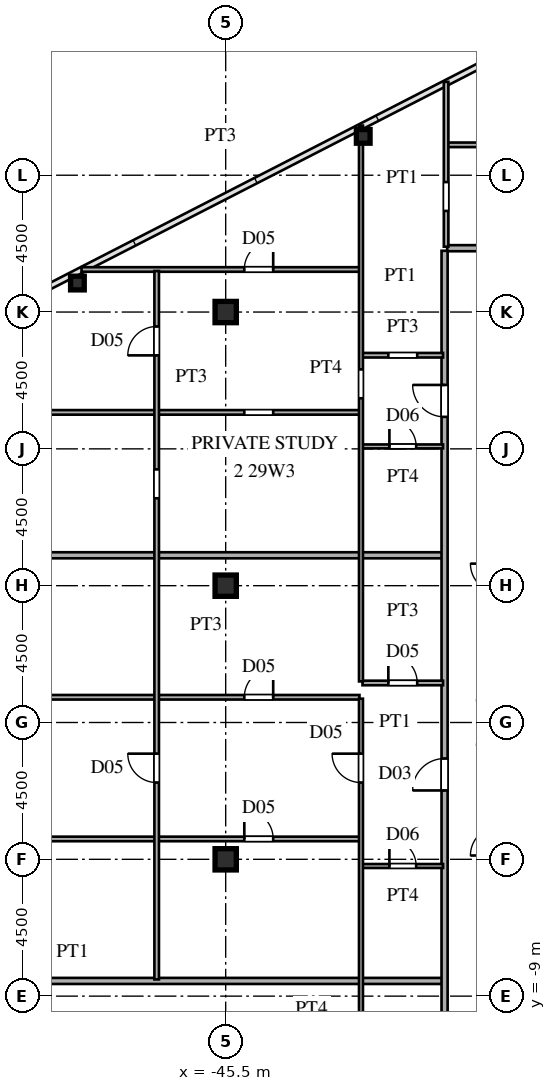
"""IFC4 building model, lengths in metres.
Left out: names, types, materials, properties, quantities, classifications, styles, units other than length and angle.
Written with IfcOpenShell. Run it as: python <this file> out.ifc"""

import sys

from ifc_helpers import new_model, si_unit, direction, frame, frame_2d, origin, origin_2d, place, context, subcontext, project, spatial, rectangle, hollow_rectangle, i_section, extrude, source, transform, mapped, element, fill, save


model = new_model("IFC4")
c1 = context("Model", 3, precision=1e-05, world=origin(), true_north=direction((0.0, 1.0)))
c2 = subcontext(c1, "Body", "Model", "MODEL_VIEW")
j1 = project(units=[si_unit("LENGTHUNIT", "METRE"), si_unit("PLANEANGLEUNIT", "RADIAN")], contexts=[c1])
p1 = place(None, origin())
s1 = spatial("IfcSite", under=j1, at=p1, CompositionType="ELEMENT")
p2 = place(p1, origin())
s2 = spatial("IfcBuilding", under=s1, at=p2, CompositionType="ELEMENT")
p3 = place(p2, frame((0.0, 0.0, 110.4)))
s3 = spatial("IfcBuildingStorey", under=s2, at=p3, CompositionType="ELEMENT", Elevation=110.4)
m1 = source(origin(), c2, "Body", "SweptSolid", [
    extrude(i_section(OverallWidth=0.7, OverallDepth=0.7, WebThickness=0.028, FlangeThickness=0.045, at=origin_2d()), origin(), (0.0, 0.0, 1.0), 3.6),
])
for number, where, z_axis, x_axis in (
    (1, (-45.5, -4.5, 0.0), (0.0, 0.0, 1.0), (1.0, 0.0, 0.0)),
    (2, (-45.5, 4.5, 0.0), (0.0, 0.0, 1.0), (1.0, 0.0, 0.0)),
    (3, (-45.5, 13.5, 0.0), (0.0, 0.0, 1.0), (1.0, 0.0, 0.0)),
):
    element("IfcColumn", number, at=place(p3, frame(where, z_axis=z_axis, x_axis=x_axis)), inside=s3, PredefinedType="COLUMN", context=c2, shape_type="MappedRepresentation", body=[
        mapped(m1, transform((0.0, 0.0, 0.0), scale=1.0)),
    ])
m2 = source(origin(), c2, "Body", "SweptSolid", [
    extrude(hollow_rectangle(XDim=0.45, YDim=0.45, WallThickness=0.018, at=origin_2d()), origin(), (0.0, 0.0, 1.0), 3.6),
])
for number, where, z_axis, x_axis in (
    (4, (-40.976, 19.278, 0.0), (0.0, 0.0, 1.0), (1.0, 0.0, 0.0)),
    (5, (-50.377, 14.453, 0.0), (0.0, 0.0, 1.0), (1.0, 0.0, 0.0)),
):
    element("IfcColumn", number, at=place(p3, frame(where, z_axis=z_axis, x_axis=x_axis)), inside=s3, PredefinedType="COLUMN", context=c2, shape_type="MappedRepresentation", body=[
        mapped(m2, transform((0.0, 0.0, 0.0), scale=1.0)),
    ])
p4 = place(p3, frame((-62.69, -8.5, 0.0), z_axis=(0.0, 0.0, 1.0), x_axis=(1.0, 0.0, 0.0)))
e6 = element("IfcWall", 6, at=p4, inside=s3, PredefinedType="PARTITIONING", context=c2, shape_type="SweptSolid", body=[
    extrude(rectangle(XDim=24.31, YDim=0.2, at=frame_2d((12.155, 0.0))), origin(), (0.0, 0.0, 1.0), 3.38),
])
p5 = place(p3, frame((-41.0, -4.72, 0.0), z_axis=(0.0, 0.0, 1.0), x_axis=(1.0, 0.0, 0.0)))
e7 = element("IfcWall", 7, at=p5, inside=s3, PredefinedType="PARTITIONING", context=c2, shape_type="SweptSolid", body=[
    extrude(rectangle(XDim=2.65, YDim=0.13, at=frame_2d((1.325, 0.0))), origin(), (0.0, 0.0, 1.0), 3.38),
])
p6 = place(p5, frame((0.885, 0.0, 0.0)))
e8 = element("IfcOpeningElement", 8, at=p6, cuts=e7, PredefinedType="OPENING", context=c2, shape_type="SweptSolid", body=[
    extrude(rectangle(XDim=0.88, YDim=2.1, at=frame_2d((0.44, 1.05))), frame((0.0, 0.075, 0.0), z_axis=(0.0, -1.0, 0.0), x_axis=(1.0, 0.0, 0.0)), (0.0, 0.0, 1.0), 0.15),
])
p7 = place(p3, frame((-69.535, -3.83, 0.0), z_axis=(0.0, 0.0, 1.0), x_axis=(1.0, 0.0, 0.0)))
e9 = element("IfcWall", 9, at=p7, inside=s3, PredefinedType="PARTITIONING", context=c2, shape_type="SweptSolid", body=[
    extrude(rectangle(XDim=28.435, YDim=0.15, at=frame_2d((14.217, 0.0))), origin(), (0.0, 0.0, 1.0), 3.38),
])
p8 = place(p7, frame((24.647, 0.0, 0.0)))
e10 = element("IfcOpeningElement", 10, at=p8, cuts=e9, PredefinedType="OPENING", context=c2, shape_type="SweptSolid", body=[
    extrude(rectangle(XDim=0.95, YDim=2.15, at=frame_2d((0.475, 1.075))), frame((0.0, 0.085, 0.0), z_axis=(0.0, -1.0, 0.0), x_axis=(1.0, 0.0, 0.0)), (0.0, 0.0, 1.0), 0.17),
])
p9 = place(p7, frame((11.71, 0.0, 0.0)))
e11 = element("IfcOpeningElement", 11, at=p9, cuts=e9, PredefinedType="OPENING", context=c2, shape_type="SweptSolid", body=[
    extrude(rectangle(XDim=0.95, YDim=2.15, at=frame_2d((0.475, 1.075))), frame((0.0, 0.085, 0.0), z_axis=(0.0, -1.0, 0.0), x_axis=(1.0, 0.0, 0.0)), (0.0, 0.0, 1.0), 0.17),
])
p10 = place(p3, frame((-69.535, 0.83, 0.0), z_axis=(0.0, 0.0, 1.0), x_axis=(1.0, 0.0, 0.0)))
e12 = element("IfcWall", 12, at=p10, inside=s3, PredefinedType="PARTITIONING", context=c2, shape_type="SweptSolid", body=[
    extrude(rectangle(XDim=28.435, YDim=0.15, at=frame_2d((14.217, 0.0))), origin(), (0.0, 0.0, 1.0), 3.38),
])
p11 = place(p10, frame((24.647, 0.0, 0.0)))
e13 = element("IfcOpeningElement", 13, at=p11, cuts=e12, PredefinedType="OPENING", context=c2, shape_type="SweptSolid", body=[
    extrude(rectangle(XDim=0.95, YDim=2.15, at=frame_2d((0.475, 1.075))), frame((0.0, 0.085, 0.0), z_axis=(0.0, -1.0, 0.0), x_axis=(1.0, 0.0, 0.0)), (0.0, 0.0, 1.0), 0.17),
])
p12 = place(p10, frame((11.71, 0.0, 0.0)))
e14 = element("IfcOpeningElement", 14, at=p12, cuts=e12, PredefinedType="OPENING", context=c2, shape_type="SweptSolid", body=[
    extrude(rectangle(XDim=0.95, YDim=2.15, at=frame_2d((0.475, 1.075))), frame((0.0, 0.085, 0.0), z_axis=(0.0, -1.0, 0.0), x_axis=(1.0, 0.0, 0.0)), (0.0, 0.0, 1.0), 0.17),
])
p13 = place(p3, frame((-41.0, 1.3, 0.0), z_axis=(0.0, 0.0, 1.0), x_axis=(1.0, 0.0, 0.0)))
e15 = element("IfcWall", 15, at=p13, inside=s3, PredefinedType="PARTITIONING", context=c2, shape_type="SweptSolid", body=[
    extrude(rectangle(XDim=2.65, YDim=0.15, at=frame_2d((1.325, 0.0))), origin(), (0.0, 0.0, 1.0), 3.38),
])
p14 = place(p13, frame((0.85, 0.0, 0.0)))
e16 = element("IfcOpeningElement", 16, at=p14, cuts=e15, PredefinedType="OPENING", context=c2, shape_type="SweptSolid", body=[
    extrude(rectangle(XDim=0.95, YDim=2.15, at=frame_2d((0.475, 1.075))), frame((0.0, 0.085, 0.0), z_axis=(0.0, -1.0, 0.0), x_axis=(1.0, 0.0, 0.0)), (0.0, 0.0, 1.0), 0.17),
])
p15 = place(p3, frame((-68.458, 5.5, 0.0), z_axis=(0.0, 0.0, 1.0), x_axis=(1.0, 0.0, 0.0)))
e17 = element("IfcWall", 17, at=p15, inside=s3, PredefinedType="PARTITIONING", context=c2, shape_type="SweptSolid", body=[
    extrude(rectangle(XDim=30.079, YDim=0.2, at=frame_2d((15.039, 0.0))), origin(), (0.0, 0.0, 1.0), 3.38),
])
p16 = place(p3, frame((-41.0, 9.08, 0.0), z_axis=(0.0, 0.0, 1.0), x_axis=(1.0, 0.0, 0.0)))
e18 = element("IfcWall", 18, at=p16, inside=s3, PredefinedType="PARTITIONING", context=c2, shape_type="SweptSolid", body=[
    extrude(rectangle(XDim=2.65, YDim=0.13, at=frame_2d((1.325, 0.0))), origin(), (0.0, 0.0, 1.0), 3.38),
])
p17 = place(p16, frame((0.885, 0.0, 0.0)))
e19 = element("IfcOpeningElement", 19, at=p17, cuts=e18, PredefinedType="OPENING", context=c2, shape_type="SweptSolid", body=[
    extrude(rectangle(XDim=0.88, YDim=2.1, at=frame_2d((0.44, 1.05))), frame((0.0, 0.075, 0.0), z_axis=(0.0, -1.0, 0.0), x_axis=(1.0, 0.0, 0.0)), (0.0, 0.0, 1.0), 0.15),
])
p18 = place(p3, frame((-54.45, 10.2, 0.0), z_axis=(0.0, 0.0, 1.0), x_axis=(1.0, 0.0, 0.0)))
e20 = element("IfcWall", 20, at=p18, inside=s3, PredefinedType="PARTITIONING", context=c2, shape_type="SweptSolid", body=[
    extrude(rectangle(XDim=13.35, YDim=0.15, at=frame_2d((6.675, 0.0))), origin(), (0.0, 0.0, 1.0), 3.38),
])
p19 = place(p18, frame((9.562, 0.0, 0.0)))
e21 = element("IfcOpeningElement", 21, at=p19, cuts=e20, PredefinedType="OPENING", context=c2, shape_type="SweptSolid", body=[
    extrude(rectangle(XDim=0.95, YDim=2.15, at=frame_2d((0.475, 1.075))), frame((0.0, 0.085, 0.0), z_axis=(0.0, -1.0, 0.0), x_axis=(1.0, 0.0, 0.0)), (0.0, 0.0, 1.0), 0.17),
])
p20 = place(p3, frame((-41.0, 12.08, 0.0), z_axis=(0.0, 0.0, 1.0), x_axis=(1.0, 0.0, 0.0)))
e22 = element("IfcWall", 22, at=p20, inside=s3, PredefinedType="PARTITIONING", context=c2, shape_type="SweptSolid", body=[
    extrude(rectangle(XDim=2.65, YDim=0.15, at=frame_2d((1.325, 0.0))), origin(), (0.0, 0.0, 1.0), 3.38),
])
p21 = place(p20, frame((0.85, 0.0, 0.0)))
e23 = element("IfcOpeningElement", 23, at=p21, cuts=e22, PredefinedType="OPENING", context=c2, shape_type="SweptSolid", body=[
    extrude(rectangle(XDim=0.95, YDim=2.15, at=frame_2d((0.475, 1.075))), frame((0.0, 0.085, 0.0), z_axis=(0.0, -1.0, 0.0), x_axis=(1.0, 0.0, 0.0)), (0.0, 0.0, 1.0), 0.17),
])
p22 = place(p3, frame((-50.243, 14.9, 0.0), z_axis=(0.0, 0.0, 1.0), x_axis=(1.0, 0.0, 0.0)))
e24 = element("IfcWall", 24, at=p22, inside=s3, PredefinedType="PARTITIONING", context=c2, shape_type="SweptSolid", body=[
    extrude(rectangle(XDim=9.143, YDim=0.15, at=frame_2d((4.571, 0.0))), origin(), (0.0, 0.0, 1.0), 3.38),
])
p23 = place(p22, frame((5.355, 0.0, 0.0)))
e25 = element("IfcOpeningElement", 25, at=p23, cuts=e24, PredefinedType="OPENING", context=c2, shape_type="SweptSolid", body=[
    extrude(rectangle(XDim=0.95, YDim=2.15, at=frame_2d((0.475, 1.075))), frame((0.0, 0.085, 0.0), z_axis=(0.0, -1.0, 0.0), x_axis=(1.0, 0.0, 0.0)), (0.0, 0.0, 1.0), 0.17),
])
p24 = place(p3, frame((-38.215, 15.6, 0.0), z_axis=(0.0, 0.0, 1.0), x_axis=(1.0, 0.0, 0.0)))
e26 = element("IfcWall", 26, at=p24, inside=s3, PredefinedType="PARTITIONING", context=c2, shape_type="SweptSolid", body=[
    extrude(rectangle(XDim=1.63, YDim=0.2, at=frame_2d((0.815, 0.0))), origin(), (0.0, 0.0, 1.0), 3.38),
])
p25 = place(p3, frame((-38.2, 19.0, 0.0), z_axis=(0.0, 0.0, 1.0), x_axis=(1.0, 0.0, 0.0)))
e27 = element("IfcWall", 27, at=p25, inside=s3, PredefinedType="PARTITIONING", context=c2, shape_type="SweptSolid", body=[
    extrude(rectangle(XDim=10.735, YDim=0.15, at=frame_2d((5.367, 0.0))), origin(), (0.0, 0.0, 1.0), 3.38),
])
p26 = place(p25, frame((4.85, 0.0, 0.0)))
e28 = element("IfcOpeningElement", 28, at=p26, cuts=e27, PredefinedType="OPENING", context=c2, shape_type="SweptSolid", body=[
    extrude(rectangle(XDim=0.95, YDim=2.15, at=frame_2d((0.475, 1.075))), frame((0.0, 0.085, 0.0), z_axis=(0.0, -1.0, 0.0), x_axis=(1.0, 0.0, 0.0)), (0.0, 0.0, 1.0), 0.17),
])
p27 = place(p3, frame((-47.77, -8.45, 0.0), z_axis=(0.0, 0.0, 1.0), x_axis=(0.0, 1.0, 0.0)))
e29 = element("IfcWall", 29, at=p27, inside=s3, PredefinedType="PARTITIONING", context=c2, shape_type="SweptSolid", body=[
    extrude(rectangle(XDim=23.3, YDim=0.15, at=frame_2d((11.65, 0.0))), origin(), (0.0, 0.0, 1.0), 3.38),
])
p28 = place(p27, frame((6.475, 0.0, 0.0)))
e30 = element("IfcOpeningElement", 30, at=p28, cuts=e29, PredefinedType="OPENING", context=c2, shape_type="SweptSolid", body=[
    extrude(rectangle(XDim=0.95, YDim=2.15, at=frame_2d((0.475, 1.075))), frame((0.0, 0.085, 0.0), z_axis=(0.0, -1.0, 0.0), x_axis=(1.0, 0.0, 0.0)), (0.0, 0.0, 1.0), 0.17),
])
p29 = place(p27, frame((20.525, 0.0, 0.0)))
e31 = element("IfcOpeningElement", 31, at=p29, cuts=e29, PredefinedType="OPENING", context=c2, shape_type="SweptSolid", body=[
    extrude(rectangle(XDim=0.95, YDim=2.15, at=frame_2d((0.475, 1.075))), frame((0.0, 0.085, 0.0), z_axis=(0.0, -1.0, 0.0), x_axis=(1.0, 0.0, 0.0)), (0.0, 0.0, 1.0), 0.17),
])
p30 = place(p27, frame((15.825, 0.0, 0.0)))
e32 = element("IfcOpeningElement", 32, at=p30, cuts=e29, PredefinedType="OPENING", context=c2, shape_type="SweptSolid", body=[
    extrude(rectangle(XDim=0.95, YDim=2.15, at=frame_2d((0.475, 1.075))), frame((0.0, 0.085, 0.0), z_axis=(0.0, -1.0, 0.0), x_axis=(1.0, 0.0, 0.0)), (0.0, 0.0, 1.0), 0.17),
])
p31 = place(p3, frame((-41.05, -19.634, 0.0), z_axis=(0.0, 0.0, 1.0), x_axis=(0.0, 1.0, 0.0)))
e33 = element("IfcWall", 33, at=p31, inside=s3, PredefinedType="PARTITIONING", context=c2, shape_type="SweptSolid", body=[
    extrude(rectangle(XDim=20.417, YDim=0.13, at=frame_2d((10.208, 0.0))), origin(), (0.0, 0.0, 1.0), 2.99),
])
p32 = place(p31, frame((5.987, 0.0, 0.0)))
e34 = element("IfcOpeningElement", 34, at=p32, cuts=e33, PredefinedType="OPENING", context=c2, shape_type="SweptSolid", body=[
    extrude(rectangle(XDim=0.95, YDim=2.15, at=frame_2d((0.475, 1.075))), frame((0.0, 0.075, 0.0), z_axis=(0.0, -1.0, 0.0), x_axis=(1.0, 0.0, 0.0)), (0.0, 0.0, 1.0), 0.15),
])
p33 = place(p31, frame((17.659, 0.0, 0.0)))
e35 = element("IfcOpeningElement", 35, at=p33, cuts=e33, PredefinedType="OPENING", context=c2, shape_type="SweptSolid", body=[
    extrude(rectangle(XDim=0.95, YDim=2.15, at=frame_2d((0.475, 1.075))), frame((0.0, 0.075, 0.0), z_axis=(0.0, -1.0, 0.0), x_axis=(1.0, 0.0, 0.0)), (0.0, 0.0, 1.0), 0.15),
])
p34 = place(p3, frame((-41.05, 1.352, 0.0), z_axis=(0.0, 0.0, 1.0), x_axis=(0.0, 1.0, 0.0)))
e36 = element("IfcWall", 36, at=p34, inside=s3, PredefinedType="PARTITIONING", context=c2, shape_type="SweptSolid", body=[
    extrude(rectangle(XDim=18.282, YDim=0.13, at=frame_2d((9.141, 0.0))), origin(), (0.0, 0.0, 1.0), 2.99),
])
p35 = place(p34, frame((9.312, 0.0, 0.0)))
e37 = element("IfcOpeningElement", 37, at=p35, cuts=e36, PredefinedType="OPENING", context=c2, shape_type="SweptSolid", body=[
    extrude(rectangle(XDim=0.95, YDim=2.15, at=frame_2d((0.475, 1.075))), frame((0.0, 0.075, 0.0), z_axis=(0.0, -1.0, 0.0), x_axis=(1.0, 0.0, 0.0)), (0.0, 0.0, 1.0), 0.15),
])
p36 = place(p3, frame((-38.3, -15.515, 0.0), z_axis=(0.0, 0.0, 1.0), x_axis=(0.0, 1.0, 0.0)))
e38 = element("IfcWall", 38, at=p36, inside=s3, PredefinedType="PARTITIONING", context=c2, shape_type="SweptSolid", body=[
    extrude(rectangle(XDim=31.03, YDim=0.2, at=frame_2d((15.515, 0.0))), origin(), (0.0, 0.0, 1.0), 3.38),
])
p37 = place(p36, frame((2.345, 0.0, 0.0)))
e39 = element("IfcOpeningElement", 39, at=p37, cuts=e38, PredefinedType="OPENING", context=c2, shape_type="SweptSolid", body=[
    extrude(rectangle(XDim=1.05, YDim=2.25, at=frame_2d((0.525, 1.125))), frame((0.0, 0.11, 0.0), z_axis=(0.0, -1.0, 0.0), x_axis=(1.0, 0.0, 0.0)), (0.0, 0.0, 1.0), 0.22),
])
p38 = place(p36, frame((13.28, 0.0, 0.0)))
e40 = element("IfcOpeningElement", 40, at=p38, cuts=e38, PredefinedType="OPENING", context=c2, shape_type="SweptSolid", body=[
    extrude(rectangle(XDim=1.05, YDim=2.25, at=frame_2d((0.525, 1.125))), frame((0.0, 0.11, 0.0), z_axis=(0.0, -1.0, 0.0), x_axis=(1.0, 0.0, 0.0)), (0.0, 0.0, 1.0), 0.22),
])
p39 = place(p36, frame((25.567, 0.0, 0.0)))
e41 = element("IfcOpeningElement", 41, at=p39, cuts=e38, PredefinedType="OPENING", context=c2, shape_type="SweptSolid", body=[
    extrude(rectangle(XDim=1.05, YDim=2.25, at=frame_2d((0.525, 1.125))), frame((0.0, 0.11, 0.0), z_axis=(0.0, -1.0, 0.0), x_axis=(1.0, 0.0, 0.0)), (0.0, 0.0, 1.0), 0.22),
])
p40 = place(p3, frame((-38.25, 15.65, 0.0), z_axis=(0.0, 0.0, 1.0), x_axis=(0.0, 1.0, 0.0)))
e42 = element("IfcWall", 42, at=p40, inside=s3, PredefinedType="PARTITIONING", context=c2, shape_type="SweptSolid", body=[
    extrude(rectangle(XDim=5.421, YDim=0.15, at=frame_2d((2.71, 0.0))), origin(), (0.0, 0.0, 1.0), 3.38),
])
p41 = place(p40, frame((1.175, 0.0, 0.0)))
e43 = element("IfcOpeningElement", 43, at=p41, cuts=e42, PredefinedType="OPENING", context=c2, shape_type="SweptSolid", body=[
    extrude(rectangle(XDim=0.95, YDim=2.15, at=frame_2d((0.475, 1.075))), frame((0.0, 0.085, 0.0), z_axis=(0.0, -1.0, 0.0), x_axis=(1.0, 0.0, 0.0)), (0.0, 0.0, 1.0), 0.17),
])
m3 = source(origin(), c2, "Body", "SweptSolid", [
    extrude(rectangle(XDim=0.88, YDim=2.1, at=frame_2d((0.44, 1.05))), frame((0.0, 0.025, 0.0), z_axis=(0.0, -1.0, 0.0), x_axis=(1.0, 0.0, 0.0)), (0.0, 0.0, 1.0), 0.05),
])
p42 = place(p6, origin())
e44 = element("IfcDoor", 44, at=p42, inside=s3, OperationType="SINGLE_SWING_LEFT", PredefinedType="DOOR", context=c2, shape_type="MappedRepresentation", body=[
    mapped(m3, transform((0.0, 0.0, 0.0), scale=1.0)),
])
fill(e8, e44)
m4 = source(origin(), c2, "Body", "SweptSolid", [
    extrude(rectangle(XDim=0.95, YDim=2.15, at=frame_2d((0.475, 1.075))), frame((0.0, 0.025, 0.0), z_axis=(0.0, -1.0, 0.0), x_axis=(1.0, 0.0, 0.0)), (0.0, 0.0, 1.0), 0.05),
])
p43 = place(p8, origin())
e45 = element("IfcDoor", 45, at=p43, inside=s3, OperationType="SINGLE_SWING_LEFT", PredefinedType="DOOR", context=c2, shape_type="MappedRepresentation", body=[
    mapped(m4, transform((0.0, 0.0, 0.0), scale=1.0)),
])
fill(e10, e45)
p44 = place(p11, origin())
e46 = element("IfcDoor", 46, at=p44, inside=s3, OperationType="SINGLE_SWING_RIGHT", PredefinedType="DOOR", context=c2, shape_type="MappedRepresentation", body=[
    mapped(m4, transform((0.0, 0.0, 0.0), scale=1.0)),
])
fill(e13, e46)
p45 = place(p14, origin())
e47 = element("IfcDoor", 47, at=p45, inside=s3, OperationType="SINGLE_SWING_LEFT", PredefinedType="DOOR", context=c2, shape_type="MappedRepresentation", body=[
    mapped(m4, transform((0.0, 0.0, 0.0), scale=1.0)),
])
fill(e16, e47)
p46 = place(p17, origin())
e48 = element("IfcDoor", 48, at=p46, inside=s3, OperationType="SINGLE_SWING_LEFT", PredefinedType="DOOR", context=c2, shape_type="MappedRepresentation", body=[
    mapped(m3, transform((0.0, 0.0, 0.0), scale=1.0)),
])
fill(e19, e48)
p47 = place(p23, origin())
e49 = element("IfcDoor", 49, at=p47, inside=s3, OperationType="SINGLE_SWING_RIGHT", PredefinedType="DOOR", context=c2, shape_type="MappedRepresentation", body=[
    mapped(m4, transform((0.0, 0.0, 0.0), scale=1.0)),
])
fill(e25, e49)
p48 = place(p28, origin())
e50 = element("IfcDoor", 50, at=p48, inside=s3, OperationType="SINGLE_SWING_RIGHT", PredefinedType="DOOR", context=c2, shape_type="MappedRepresentation", body=[
    mapped(m4, transform((0.0, 0.0, 0.0), scale=1.0)),
])
fill(e30, e50)
p49 = place(p29, origin())
e51 = element("IfcDoor", 51, at=p49, inside=s3, OperationType="SINGLE_SWING_LEFT", PredefinedType="DOOR", context=c2, shape_type="MappedRepresentation", body=[
    mapped(m4, transform((0.0, 0.0, 0.0), scale=1.0)),
])
fill(e31, e51)
p50 = place(p33, origin())
e52 = element("IfcDoor", 52, at=p50, inside=s3, OperationType="SINGLE_SWING_RIGHT", PredefinedType="DOOR", context=c2, shape_type="MappedRepresentation", body=[
    mapped(m4, transform((0.0, 0.0, 0.0), scale=1.0)),
])
fill(e35, e52)
m5 = source(origin(), c2, "Body", "SweptSolid", [
    extrude(rectangle(XDim=1.05, YDim=2.25, at=frame_2d((0.525, 1.125))), frame((0.0, 0.025, 0.0), z_axis=(0.0, -1.0, 0.0), x_axis=(1.0, 0.0, 0.0)), (0.0, 0.0, 1.0), 0.05),
])
p51 = place(p38, origin())
e53 = element("IfcDoor", 53, at=p51, inside=s3, OperationType="SINGLE_SWING_LEFT", PredefinedType="DOOR", context=c2, shape_type="MappedRepresentation", body=[
    mapped(m5, transform((0.0, 0.0, 0.0), scale=1.0)),
])
fill(e40, e53)
p52 = place(p39, origin())
e54 = element("IfcDoor", 54, at=p52, inside=s3, OperationType="SINGLE_SWING_RIGHT", PredefinedType="DOOR", context=c2, shape_type="MappedRepresentation", body=[
    mapped(m5, transform((0.0, 0.0, 0.0), scale=1.0)),
])
fill(e41, e54)
save(model, sys.argv[1])
